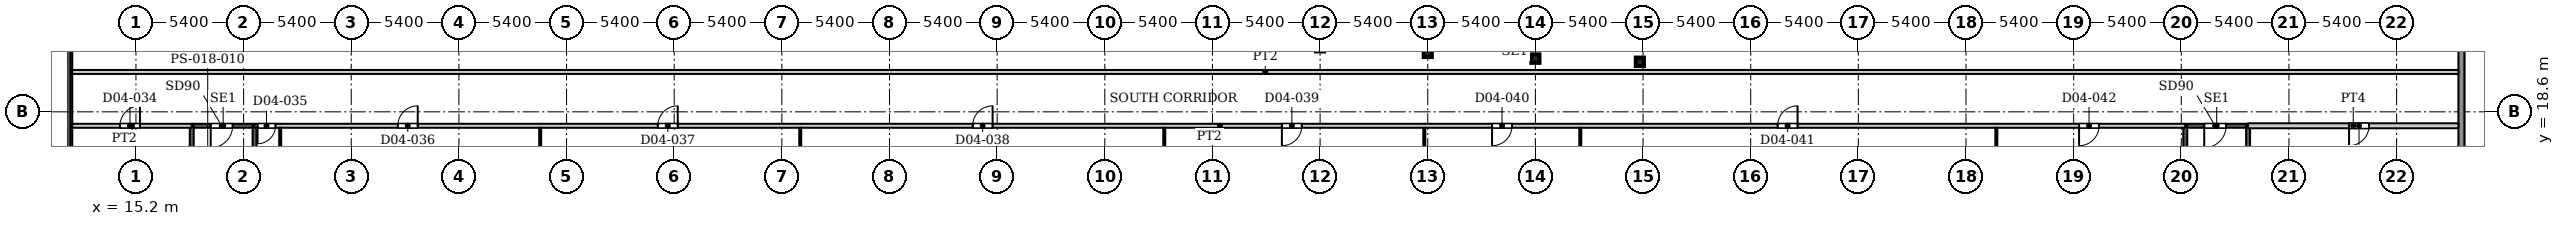
"""IFC4 building model, lengths in metres.
Left out: names, types, materials, properties, quantities, classifications, styles, units other than length and angle.
Written with IfcOpenShell. Run it as: python <this file> out.ifc"""

import sys

from ifc_helpers import new_model, si_unit, direction, frame, frame_2d, origin, origin_2d, place, context, subcontext, project, spatial, rectangle, i_section, extrude, source, transform, mapped, element, fill, save


model = new_model("IFC4")
c1 = context("Model", 3, precision=1e-05, world=origin(), true_north=direction((0.0, 1.0)))
c2 = subcontext(c1, "Body", "Model", "MODEL_VIEW")
j1 = project(units=[si_unit("LENGTHUNIT", "METRE"), si_unit("PLANEANGLEUNIT", "RADIAN")], contexts=[c1])
p1 = place(None, origin())
s1 = spatial("IfcSite", under=j1, at=p1, CompositionType="ELEMENT")
p2 = place(p1, origin())
s2 = spatial("IfcBuilding", under=s1, at=p2, CompositionType="ELEMENT")
p3 = place(p2, frame((0.0, 0.0, 21.5)))
s3 = spatial("IfcBuildingStorey", under=s2, at=p3, CompositionType="ELEMENT", Elevation=21.5)
for number, where, z_axis, x_axis in (
    (1, (90.64, 21.11, 0.0), (0.0, 0.0, 1.0), (1.0, 0.0, 0.0)),
    (2, (85.4, 21.27, 0.0), (0.0, 0.0, 1.0), (1.0, 0.0, 0.0)),
    (3, (80.0, 21.56, 0.0), (0.0, 0.0, 1.0), (1.0, 0.0, 0.0)),
):
    element("IfcColumn", number, at=place(p3, frame(where, z_axis=z_axis, x_axis=x_axis)), inside=s3, PredefinedType="COLUMN", context=c2, shape_type="SweptSolid", body=[
        extrude(i_section(OverallWidth=0.409, OverallDepth=0.425, WebThickness=0.033, FlangeThickness=0.052, FilletRadius=0.013, at=origin_2d()), origin(), (0.0, 0.0, 1.0), 4.5),
    ])
p4 = place(p3, frame((131.85, 54.72, 0.0), z_axis=(0.0, 0.0, 1.0), x_axis=(0.0, -1.0, 0.0)))
e4 = element("IfcWall", 4, at=p4, inside=s3, PredefinedType="SOLIDWALL", context=c2, shape_type="SweptSolid", body=[
    extrude(rectangle(XDim=38.72, YDim=0.3, at=frame_2d((19.36, 0.0))), origin(), (0.0, 0.0, 1.0), 4.25),
])
p5 = place(p4, frame((2.435, 0.0, 0.9)))
e5 = element("IfcOpeningElement", 5, at=p5, cuts=e4, PredefinedType="OPENING", context=c2, shape_type="SweptSolid", body=[
    extrude(rectangle(XDim=2.7, YDim=2.1, at=frame_2d((1.35, 1.05))), frame((0.0, 0.16, 0.0), z_axis=(0.0, -1.0, 0.0), x_axis=(1.0, 0.0, 0.0)), (0.0, 0.0, 1.0), 0.32),
])
p6 = place(p4, frame((13.58, 0.0, 0.9)))
e6 = element("IfcOpeningElement", 6, at=p6, cuts=e4, PredefinedType="OPENING", context=c2, shape_type="SweptSolid", body=[
    extrude(rectangle(XDim=2.7, YDim=2.1, at=frame_2d((1.35, 1.05))), frame((0.0, 0.16, 0.0), z_axis=(0.0, -1.0, 0.0), x_axis=(1.0, 0.0, 0.0)), (0.0, 0.0, 1.0), 0.32),
])
p7 = place(p4, frame((26.16, 0.0, 0.9)))
e7 = element("IfcOpeningElement", 7, at=p7, cuts=e4, PredefinedType="OPENING", context=c2, shape_type="SweptSolid", body=[
    extrude(rectangle(XDim=2.7, YDim=2.1, at=frame_2d((1.35, 1.05))), frame((0.0, 0.16, 0.0), z_axis=(0.0, -1.0, 0.0), x_axis=(1.0, 0.0, 0.0)), (0.0, 0.0, 1.0), 0.32),
])
p8 = place(p3, frame((18.0, 17.9, 0.0), z_axis=(0.0, 0.0, 1.0), x_axis=(1.0, 0.0, 0.0)))
e8 = element("IfcWall", 8, at=p8, inside=s3, PredefinedType="SHEAR", context=c2, shape_type="SweptSolid", body=[
    extrude(rectangle(XDim=3.15, YDim=0.2, at=frame_2d((1.575, 0.0))), origin(), (0.0, 0.0, 1.0), 4.5),
])
p9 = place(p8, frame((0.95, 0.0, 0.0)))
e9 = element("IfcOpeningElement", 9, at=p9, cuts=e8, PredefinedType="OPENING", context=c2, shape_type="SweptSolid", body=[
    extrude(rectangle(XDim=1.1, YDim=2.2, at=frame_2d((0.55, 1.1))), frame((0.0, 0.11, 0.0), z_axis=(0.0, -1.0, 0.0), x_axis=(1.0, 0.0, 0.0)), (0.0, 0.0, 1.0), 0.22),
])
p10 = place(p3, frame((18.0, 11.2, 0.0), z_axis=(0.0, 0.0, 1.0), x_axis=(0.0, 1.0, 0.0)))
e10 = element("IfcWall", 10, at=p10, inside=s3, PredefinedType="SHEAR", context=c2, shape_type="SweptSolid", body=[
    extrude(rectangle(XDim=6.7, YDim=0.2, at=frame_2d((3.35, 0.0))), origin(), (0.0, 0.0, 1.0), 4.5),
])
p11 = place(p3, frame((21.15, 10.0, 0.0), z_axis=(0.0, 0.0, 1.0), x_axis=(0.0, 1.0, 0.0)))
e11 = element("IfcWall", 11, at=p11, inside=s3, PredefinedType="SHEAR", context=c2, shape_type="SweptSolid", body=[
    extrude(rectangle(XDim=7.9, YDim=0.2, at=frame_2d((3.95, 0.0))), origin(), (0.0, 0.0, 1.0), 4.5),
])
p12 = place(p3, frame((118.0, 17.9, 0.0), z_axis=(0.0, 0.0, 1.0), x_axis=(1.0, 0.0, 0.0)))
e12 = element("IfcWall", 12, at=p12, inside=s3, PredefinedType="SHEAR", context=c2, shape_type="SweptSolid", body=[
    extrude(rectangle(XDim=3.15, YDim=0.2, at=frame_2d((1.575, 0.0))), origin(), (0.0, 0.0, 1.0), 4.5),
])
p13 = place(p12, frame((0.95, 0.0, 0.0)))
e13 = element("IfcOpeningElement", 13, at=p13, cuts=e12, PredefinedType="OPENING", context=c2, shape_type="SweptSolid", body=[
    extrude(rectangle(XDim=1.1, YDim=2.2, at=frame_2d((0.55, 1.1))), frame((0.0, 0.11, 0.0), z_axis=(0.0, -1.0, 0.0), x_axis=(1.0, 0.0, 0.0)), (0.0, 0.0, 1.0), 0.22),
])
p14 = place(p3, frame((118.0, 11.2, 0.0), z_axis=(0.0, 0.0, 1.0), x_axis=(0.0, 1.0, 0.0)))
e14 = element("IfcWall", 14, at=p14, inside=s3, PredefinedType="SHEAR", context=c2, shape_type="SweptSolid", body=[
    extrude(rectangle(XDim=6.7, YDim=0.2, at=frame_2d((3.35, 0.0))), origin(), (0.0, 0.0, 1.0), 4.5),
])
p15 = place(p3, frame((121.15, 10.0, 0.0), z_axis=(0.0, 0.0, 1.0), x_axis=(0.0, 1.0, 0.0)))
e15 = element("IfcWall", 15, at=p15, inside=s3, PredefinedType="SHEAR", context=c2, shape_type="SweptSolid", body=[
    extrude(rectangle(XDim=7.9, YDim=0.2, at=frame_2d((3.95, 0.0))), origin(), (0.0, 0.0, 1.0), 4.5),
])
p16 = place(p3, frame((12.0, 17.9, 0.0), z_axis=(0.0, 0.0, 1.0), x_axis=(1.0, 0.0, 0.0)))
e16 = element("IfcWall", 16, at=p16, inside=s3, PredefinedType="PARTITIONING", context=c2, shape_type="SweptSolid", body=[
    extrude(rectangle(XDim=6.0, YDim=0.2, at=frame_2d((3.0, 0.0))), origin(), (0.0, 0.0, 1.0), 4.18),
])
p17 = place(p16, frame((2.4, 0.0, 0.0)))
e17 = element("IfcOpeningElement", 17, at=p17, cuts=e16, PredefinedType="OPENING", context=c2, shape_type="SweptSolid", body=[
    extrude(rectangle(XDim=1.0, YDim=2.1, at=frame_2d((0.5, 1.05))), frame((0.0, 0.11, 0.0), z_axis=(0.0, -1.0, 0.0), x_axis=(1.0, 0.0, 0.0)), (0.0, 0.0, 1.0), 0.22),
])
p18 = place(p3, frame((12.0, 20.6, 0.0), z_axis=(0.0, 0.0, 1.0), x_axis=(1.0, 0.0, 0.0)))
e18 = element("IfcWall", 18, at=p18, inside=s3, PredefinedType="PARTITIONING", context=c2, shape_type="SweptSolid", body=[
    extrude(rectangle(XDim=119.701, YDim=0.2, at=frame_2d((59.851, 0.0))), origin(), (0.0, 0.0, 1.0), 4.18),
])
p19 = place(p3, frame((21.15, 17.9, 0.0), z_axis=(0.0, 0.0, 1.0), x_axis=(1.0, 0.0, 0.0)))
e19 = element("IfcWall", 19, at=p19, inside=s3, PredefinedType="PARTITIONING", context=c2, shape_type="SweptSolid", body=[
    extrude(rectangle(XDim=96.85, YDim=0.2, at=frame_2d((48.425, 0.0))), origin(), (0.0, 0.0, 1.0), 4.18),
])
p20 = place(p19, frame((0.15, 0.0, 0.0)))
e20 = element("IfcOpeningElement", 20, at=p20, cuts=e19, PredefinedType="OPENING", context=c2, shape_type="SweptSolid", body=[
    extrude(rectangle(XDim=0.9, YDim=2.1, at=frame_2d((0.45, 1.05))), frame((0.0, 0.11, 0.0), z_axis=(0.0, -1.0, 0.0), x_axis=(1.0, 0.0, 0.0)), (0.0, 0.0, 1.0), 0.22),
])
p21 = place(p19, frame((7.185, 0.0, 0.0)))
e21 = element("IfcOpeningElement", 21, at=p21, cuts=e19, PredefinedType="OPENING", context=c2, shape_type="SweptSolid", body=[
    extrude(rectangle(XDim=1.0, YDim=2.1, at=frame_2d((0.5, 1.05))), frame((0.0, 0.11, 0.0), z_axis=(0.0, -1.0, 0.0), x_axis=(1.0, 0.0, 0.0)), (0.0, 0.0, 1.0), 0.22),
])
p22 = place(p19, frame((20.228, 0.0, 0.0)))
e22 = element("IfcOpeningElement", 22, at=p22, cuts=e19, PredefinedType="OPENING", context=c2, shape_type="SweptSolid", body=[
    extrude(rectangle(XDim=1.0, YDim=2.1, at=frame_2d((0.5, 1.05))), frame((0.0, 0.11, 0.0), z_axis=(0.0, -1.0, 0.0), x_axis=(1.0, 0.0, 0.0)), (0.0, 0.0, 1.0), 0.22),
])
p23 = place(p19, frame((36.022, 0.0, 0.0)))
e23 = element("IfcOpeningElement", 23, at=p23, cuts=e19, PredefinedType="OPENING", context=c2, shape_type="SweptSolid", body=[
    extrude(rectangle(XDim=1.0, YDim=2.1, at=frame_2d((0.5, 1.05))), frame((0.0, 0.11, 0.0), z_axis=(0.0, -1.0, 0.0), x_axis=(1.0, 0.0, 0.0)), (0.0, 0.0, 1.0), 0.22),
])
p24 = place(p19, frame((51.533, 0.0, 0.0)))
e24 = element("IfcOpeningElement", 24, at=p24, cuts=e19, PredefinedType="OPENING", context=c2, shape_type="SweptSolid", body=[
    extrude(rectangle(XDim=1.0, YDim=2.1, at=frame_2d((0.5, 1.05))), frame((0.0, 0.11, 0.0), z_axis=(0.0, -1.0, 0.0), x_axis=(1.0, 0.0, 0.0)), (0.0, 0.0, 1.0), 0.22),
])
p25 = place(p19, frame((62.076, 0.0, 0.0)))
e25 = element("IfcOpeningElement", 25, at=p25, cuts=e19, PredefinedType="OPENING", context=c2, shape_type="SweptSolid", body=[
    extrude(rectangle(XDim=1.0, YDim=2.1, at=frame_2d((0.5, 1.05))), frame((0.0, 0.11, 0.0), z_axis=(0.0, -1.0, 0.0), x_axis=(1.0, 0.0, 0.0)), (0.0, 0.0, 1.0), 0.22),
])
p26 = place(p19, frame((76.402, 0.0, 0.0)))
e26 = element("IfcOpeningElement", 26, at=p26, cuts=e19, PredefinedType="OPENING", context=c2, shape_type="SweptSolid", body=[
    extrude(rectangle(XDim=1.0, YDim=2.1, at=frame_2d((0.5, 1.05))), frame((0.0, 0.11, 0.0), z_axis=(0.0, -1.0, 0.0), x_axis=(1.0, 0.0, 0.0)), (0.0, 0.0, 1.0), 0.22),
])
p27 = place(p19, frame((91.522, 0.0, 0.0)))
e27 = element("IfcOpeningElement", 27, at=p27, cuts=e19, PredefinedType="OPENING", context=c2, shape_type="SweptSolid", body=[
    extrude(rectangle(XDim=1.0, YDim=2.1, at=frame_2d((0.5, 1.05))), frame((0.0, 0.11, 0.0), z_axis=(0.0, -1.0, 0.0), x_axis=(1.0, 0.0, 0.0)), (0.0, 0.0, 1.0), 0.22),
])
for number, where, z_axis, x_axis in (
    (28, (22.435, 10.299, 0.0), (0.0, 0.0, 1.0), (0.0, 1.0, 0.0)),
    (29, (35.478, 10.299, 0.0), (0.0, 0.0, 1.0), (0.0, 1.0, 0.0)),
    (30, (48.522, 10.299, 0.0), (0.0, 0.0, 1.0), (0.0, 1.0, 0.0)),
):
    element("IfcWall", number, at=place(p3, frame(where, z_axis=z_axis, x_axis=x_axis)), inside=s3, PredefinedType="PARTITIONING", context=c2, shape_type="SweptSolid", body=[
        extrude(rectangle(XDim=7.501, YDim=0.1, at=frame_2d((3.75, 0.0))), origin(), (0.0, 0.0, 1.0), 4.18),
    ])
p28 = place(p3, frame((66.783, 10.0, 0.0), z_axis=(0.0, 0.0, 1.0), x_axis=(0.0, 1.0, 0.0)))
e31 = element("IfcWall", 31, at=p28, inside=s3, PredefinedType="PARTITIONING", context=c2, shape_type="SweptSolid", body=[
    extrude(rectangle(XDim=7.8, YDim=0.1, at=frame_2d((3.9, 0.0))), origin(), (0.0, 0.0, 1.0), 4.18),
])
p29 = place(p3, frame((79.826, 10.0, 0.0), z_axis=(0.0, 0.0, 1.0), x_axis=(0.0, 1.0, 0.0)))
e32 = element("IfcWall", 32, at=p29, inside=s3, PredefinedType="PARTITIONING", context=c2, shape_type="SweptSolid", body=[
    extrude(rectangle(XDim=7.8, YDim=0.1, at=frame_2d((3.9, 0.0))), origin(), (0.0, 0.0, 1.0), 3.783),
])
for number, where, z_axis, x_axis in (
    (33, (87.652, 10.0, 0.0), (0.0, 0.0, 1.0), (0.0, 1.0, 0.0)),
    (34, (108.522, 10.0, 0.0), (0.0, 0.0, 1.0), (0.0, 1.0, 0.0)),
):
    element("IfcWall", number, at=place(p3, frame(where, z_axis=z_axis, x_axis=x_axis)), inside=s3, PredefinedType="PARTITIONING", context=c2, shape_type="SweptSolid", body=[
        extrude(rectangle(XDim=7.8, YDim=0.1, at=frame_2d((3.9, 0.0))), origin(), (0.0, 0.0, 1.0), 4.18),
    ])
p30 = place(p3, frame((121.15, 17.9, 0.0), z_axis=(0.0, 0.0, 1.0), x_axis=(1.0, 0.0, 0.0)))
e35 = element("IfcWall", 35, at=p30, inside=s3, PredefinedType="PARTITIONING", context=c2, shape_type="SweptSolid", body=[
    extrude(rectangle(XDim=10.551, YDim=0.25, at=frame_2d((5.275, 0.0))), origin(), (0.0, 0.0, 1.0), 4.18),
])
p31 = place(p30, frame((5.065, 0.0, 0.0)))
e36 = element("IfcOpeningElement", 36, at=p31, cuts=e35, PredefinedType="OPENING", context=c2, shape_type="SweptSolid", body=[
    extrude(rectangle(XDim=1.0, YDim=2.1, at=frame_2d((0.5, 1.05))), frame((0.0, 0.135, 0.0), z_axis=(0.0, -1.0, 0.0), x_axis=(1.0, 0.0, 0.0)), (0.0, 0.0, 1.0), 0.27),
])
m1 = source(origin(), c2, "Body", "SweptSolid", [
    extrude(rectangle(XDim=1.1, YDim=2.2, at=frame_2d((0.55, 1.1))), frame((0.0, 0.025, 0.0), z_axis=(0.0, -1.0, 0.0), x_axis=(1.0, 0.0, 0.0)), (0.0, 0.0, 1.0), 0.05),
])
p32 = place(p9, origin())
e37 = element("IfcDoor", 37, at=p32, inside=s3, OperationType="SINGLE_SWING_RIGHT", PredefinedType="DOOR", context=c2, shape_type="MappedRepresentation", body=[
    mapped(m1, transform((0.0, 0.0, 0.0), x_axis=(1.0, 0.0, 0.0), y_axis=(0.0, 1.0, 0.0), z_axis=(0.0, 0.0, 1.0), scale=1.0)),
])
fill(e9, e37)
p33 = place(p13, origin())
e38 = element("IfcDoor", 38, at=p33, inside=s3, OperationType="SINGLE_SWING_RIGHT", PredefinedType="DOOR", context=c2, shape_type="MappedRepresentation", body=[
    mapped(m1, transform((0.0, 0.0, 0.0), x_axis=(1.0, 0.0, 0.0), y_axis=(0.0, 1.0, 0.0), z_axis=(0.0, 0.0, 1.0), scale=1.0)),
])
fill(e13, e38)
m2 = source(origin(), c2, "Body", "SweptSolid", [
    extrude(rectangle(XDim=1.0, YDim=2.1, at=frame_2d((0.5, 1.05))), frame((0.0, 0.025, 0.0), z_axis=(0.0, -1.0, 0.0), x_axis=(1.0, 0.0, 0.0)), (0.0, 0.0, 1.0), 0.05),
])
p34 = place(p17, origin())
e39 = element("IfcDoor", 39, at=p34, inside=s3, OperationType="SINGLE_SWING_LEFT", PredefinedType="DOOR", context=c2, shape_type="MappedRepresentation", body=[
    mapped(m2, transform((0.0, 0.0, 0.0), x_axis=(1.0, 0.0, 0.0), y_axis=(0.0, 1.0, 0.0), z_axis=(0.0, 0.0, 1.0), scale=1.0)),
])
fill(e17, e39)
m3 = source(origin(), c2, "Body", "SweptSolid", [
    extrude(rectangle(XDim=0.9, YDim=2.1, at=frame_2d((0.45, 1.05))), frame((0.0, 0.025, 0.0), z_axis=(0.0, -1.0, 0.0), x_axis=(1.0, 0.0, 0.0)), (0.0, 0.0, 1.0), 0.05),
])
p35 = place(p20, origin())
e40 = element("IfcDoor", 40, at=p35, inside=s3, OperationType="SINGLE_SWING_RIGHT", PredefinedType="DOOR", context=c2, shape_type="MappedRepresentation", body=[
    mapped(m3, transform((0.0, 0.0, 0.0), x_axis=(1.0, 0.0, 0.0), y_axis=(0.0, 1.0, 0.0), z_axis=(0.0, 0.0, 1.0), scale=1.0)),
])
fill(e20, e40)
p36 = place(p21, origin())
e41 = element("IfcDoor", 41, at=p36, inside=s3, OperationType="SINGLE_SWING_LEFT", PredefinedType="DOOR", context=c2, shape_type="MappedRepresentation", body=[
    mapped(m2, transform((0.0, 0.0, 0.0), x_axis=(1.0, 0.0, 0.0), y_axis=(0.0, 1.0, 0.0), z_axis=(0.0, 0.0, 1.0), scale=1.0)),
])
fill(e21, e41)
p37 = place(p22, origin())
e42 = element("IfcDoor", 42, at=p37, inside=s3, OperationType="SINGLE_SWING_LEFT", PredefinedType="DOOR", context=c2, shape_type="MappedRepresentation", body=[
    mapped(m2, transform((0.0, 0.0, 0.0), x_axis=(1.0, 0.0, 0.0), y_axis=(0.0, 1.0, 0.0), z_axis=(0.0, 0.0, 1.0), scale=1.0)),
])
fill(e22, e42)
p38 = place(p23, origin())
e43 = element("IfcDoor", 43, at=p38, inside=s3, OperationType="SINGLE_SWING_LEFT", PredefinedType="DOOR", context=c2, shape_type="MappedRepresentation", body=[
    mapped(m2, transform((0.0, 0.0, 0.0), x_axis=(1.0, 0.0, 0.0), y_axis=(0.0, 1.0, 0.0), z_axis=(0.0, 0.0, 1.0), scale=1.0)),
])
fill(e23, e43)
p39 = place(p24, origin())
e44 = element("IfcDoor", 44, at=p39, inside=s3, OperationType="SINGLE_SWING_RIGHT", PredefinedType="DOOR", context=c2, shape_type="MappedRepresentation", body=[
    mapped(m2, transform((0.0, 0.0, 0.0), x_axis=(1.0, 0.0, 0.0), y_axis=(0.0, 1.0, 0.0), z_axis=(0.0, 0.0, 1.0), scale=1.0)),
])
fill(e24, e44)
p40 = place(p25, origin())
e45 = element("IfcDoor", 45, at=p40, inside=s3, OperationType="SINGLE_SWING_RIGHT", PredefinedType="DOOR", context=c2, shape_type="MappedRepresentation", body=[
    mapped(m2, transform((0.0, 0.0, 0.0), x_axis=(1.0, 0.0, 0.0), y_axis=(0.0, 1.0, 0.0), z_axis=(0.0, 0.0, 1.0), scale=1.0)),
])
fill(e25, e45)
p41 = place(p26, origin())
e46 = element("IfcDoor", 46, at=p41, inside=s3, OperationType="SINGLE_SWING_LEFT", PredefinedType="DOOR", context=c2, shape_type="MappedRepresentation", body=[
    mapped(m2, transform((0.0, 0.0, 0.0), x_axis=(1.0, 0.0, 0.0), y_axis=(0.0, 1.0, 0.0), z_axis=(0.0, 0.0, 1.0), scale=1.0)),
])
fill(e26, e46)
p42 = place(p27, origin())
e47 = element("IfcDoor", 47, at=p42, inside=s3, OperationType="SINGLE_SWING_RIGHT", PredefinedType="DOOR", context=c2, shape_type="MappedRepresentation", body=[
    mapped(m2, transform((0.0, 0.0, 0.0), x_axis=(1.0, 0.0, 0.0), y_axis=(0.0, 1.0, 0.0), z_axis=(0.0, 0.0, 1.0), scale=1.0)),
])
fill(e27, e47)
m4 = source(origin(), c2, "Body", "SweptSolid", [
    extrude(rectangle(XDim=1.0, YDim=2.1, at=frame_2d((0.5, 1.05))), frame((0.0, 0.025, 0.0), z_axis=(0.0, -1.0, 0.0), x_axis=(1.0, 0.0, 0.0)), (0.0, 0.0, 1.0), 0.05),
])
p43 = place(p31, origin())
e48 = element("IfcDoor", 48, at=p43, inside=s3, OperationType="SINGLE_SWING_RIGHT", PredefinedType="DOOR", context=c2, shape_type="MappedRepresentation", body=[
    mapped(m4, transform((0.0, 0.0, 0.0), x_axis=(1.0, 0.0, 0.0), y_axis=(0.0, 1.0, 0.0), z_axis=(0.0, 0.0, 1.0), scale=1.0)),
])
fill(e36, e48)
save(model, sys.argv[1])
